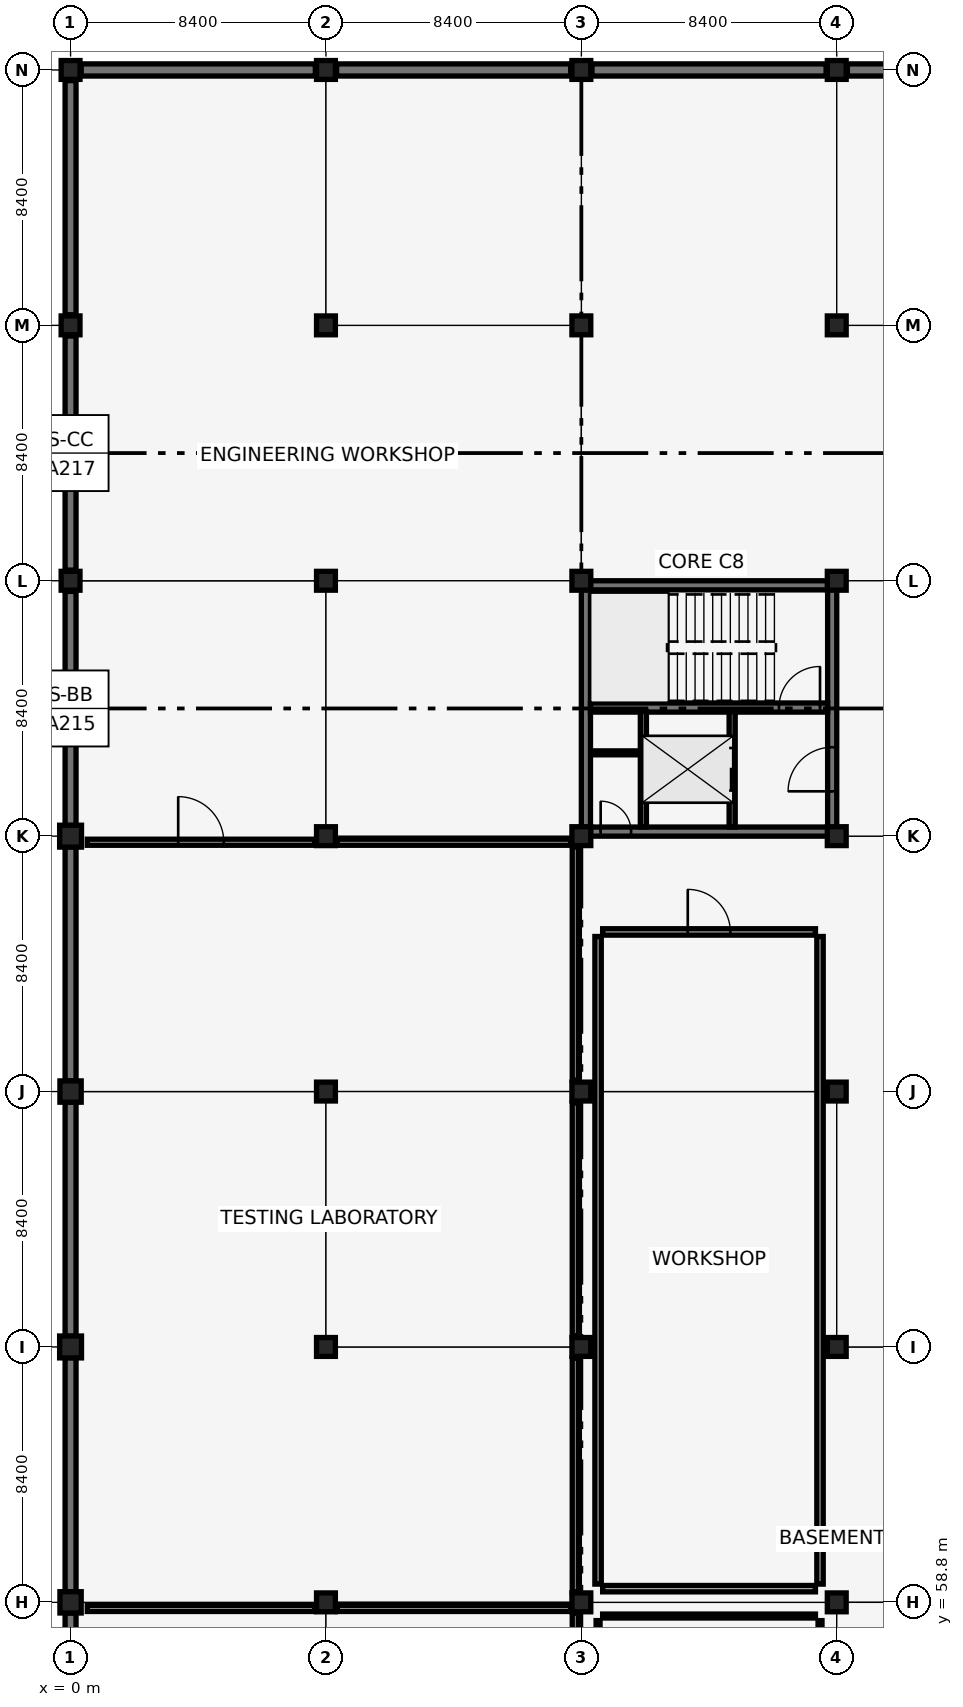
"""IFC4 building model, lengths in metres.
Left out: names, types, materials, properties, quantities, classifications, styles, units other than length and angle.
Written with IfcOpenShell. Run it as: python <this file> out.ifc"""

import sys

from ifc_helpers import new_model, si_unit, direction, frame, frame_2d, origin, origin_2d, place, context, subcontext, project, spatial, rectangle, extrude, element, fill, save


model = new_model("IFC4")
c1 = context("Model", 3, precision=1e-05, world=origin(), true_north=direction((0.0, 1.0)))
c2 = subcontext(c1, "Body", "Model", "MODEL_VIEW")
j1 = project(units=[si_unit("LENGTHUNIT", "METRE"), si_unit("PLANEANGLEUNIT", "RADIAN")], contexts=[c1])
p1 = place(None, origin())
s1 = spatial("IfcSite", under=j1, at=p1, CompositionType="ELEMENT")
p2 = place(p1, origin())
s2 = spatial("IfcBuilding", under=s1, at=p2, CompositionType="ELEMENT")
p3 = place(p2, frame((0.0, 0.0, -4.42)))
s3 = spatial("IfcBuildingStorey", under=s2, at=p3, CompositionType="ELEMENT", Elevation=-4.42)
p4 = place(p3, frame((0.0, 50.75, 0.0), z_axis=(0.0, 0.0, 1.0), x_axis=(0.0, 1.0, 0.0)))
e1 = element("IfcWall", 1, at=p4, inside=s3, PredefinedType="USERDEFINED", context=c2, shape_type="SweptSolid", body=[
    extrude(rectangle(XDim=7.7, YDim=0.36, at=frame_2d((3.85, 0.0))), origin(), (0.0, 0.0, 1.0), 4.12),
])
p5 = place(p3, frame((0.0, 59.15, 0.0), z_axis=(0.0, 0.0, 1.0), x_axis=(0.0, 1.0, 0.0)))
e2 = element("IfcWall", 2, at=p5, inside=s3, PredefinedType="USERDEFINED", context=c2, shape_type="SweptSolid", body=[
    extrude(rectangle(XDim=7.7, YDim=0.36, at=frame_2d((3.85, 0.0))), origin(), (0.0, 0.0, 1.0), 4.12),
])
for number, where, z_axis, x_axis in (
    (3, (0.0, 67.55, 0.0), (0.0, 0.0, 1.0), (0.0, 1.0, 0.0)),
    (4, (0.0, 75.95, 0.0), (0.0, 0.0, 1.0), (0.0, 1.0, 0.0)),
    (5, (0.0, 84.35, 0.0), (0.0, 0.0, 1.0), (0.0, 1.0, 0.0)),
    (6, (0.0, 92.75, 0.0), (0.0, 0.0, 1.0), (0.0, 1.0, 0.0)),
):
    element("IfcWall", number, at=place(p3, frame(where, z_axis=z_axis, x_axis=x_axis)), inside=s3, PredefinedType="USERDEFINED", context=c2, shape_type="SweptSolid", body=[
        extrude(rectangle(XDim=7.7, YDim=0.36, at=frame_2d((3.85, 0.0))), origin(), (0.0, 0.0, 1.0), 4.12),
    ])
p6 = place(p3, frame((0.35, 109.2, 0.0), z_axis=(0.0, 0.0, 1.0), x_axis=(1.0, 0.0, 0.0)))
e7 = element("IfcWall", 7, at=p6, inside=s3, PredefinedType="USERDEFINED", context=c2, shape_type="SweptSolid", body=[
    extrude(rectangle(XDim=7.7, YDim=0.4, at=frame_2d((3.85, 0.0))), origin(), (0.0, 0.0, 1.0), 4.12),
])
p7 = place(p3, frame((0.0, 101.15, 0.0), z_axis=(0.0, 0.0, 1.0), x_axis=(0.0, 1.0, 0.0)))
e8 = element("IfcWall", 8, at=p7, inside=s3, PredefinedType="USERDEFINED", context=c2, shape_type="SweptSolid", body=[
    extrude(rectangle(XDim=7.7, YDim=0.36, at=frame_2d((3.85, 0.0))), origin(), (0.0, 0.0, 1.0), 4.12),
])
p8 = place(p3, frame((8.75, 109.2, 0.0), z_axis=(0.0, 0.0, 1.0), x_axis=(1.0, 0.0, 0.0)))
e9 = element("IfcWall", 9, at=p8, inside=s3, PredefinedType="USERDEFINED", context=c2, shape_type="SweptSolid", body=[
    extrude(rectangle(XDim=7.7, YDim=0.4, at=frame_2d((3.85, 0.0))), origin(), (0.0, 0.0, 1.0), 4.12),
])
p9 = place(p3, frame((17.15, 109.2, 0.0), z_axis=(0.0, 0.0, 1.0), x_axis=(1.0, 0.0, 0.0)))
e10 = element("IfcWall", 10, at=p9, inside=s3, PredefinedType="USERDEFINED", context=c2, shape_type="SweptSolid", body=[
    extrude(rectangle(XDim=7.7, YDim=0.4, at=frame_2d((3.85, 0.0))), origin(), (0.0, 0.0, 1.0), 4.12),
])
p10 = place(p3, frame((25.55, 109.2, 0.0), z_axis=(0.0, 0.0, 1.0), x_axis=(1.0, 0.0, 0.0)))
e11 = element("IfcWall", 11, at=p10, inside=s3, PredefinedType="USERDEFINED", context=c2, shape_type="SweptSolid", body=[
    extrude(rectangle(XDim=7.7, YDim=0.4, at=frame_2d((3.85, 0.0))), origin(), (0.0, 0.0, 1.0), 4.12),
])
p11 = place(p3, frame((16.95, 84.15, 0.0), z_axis=(0.0, 0.0, 1.0), x_axis=(1.0, 0.0, 0.0)))
e12 = element("IfcWall", 12, at=p11, inside=s3, PredefinedType="SHEAR", context=c2, shape_type="SweptSolid", body=[
    extrude(rectangle(XDim=8.1, YDim=0.3, at=frame_2d((4.05, 0.0))), origin(), (0.0, 0.0, 1.0), 4.12),
])
p12 = place(p11, frame((0.485, 0.0, 0.0)))
e13 = element("IfcOpeningElement", 13, at=p12, cuts=e12, PredefinedType="OPENING", context=c2, shape_type="SweptSolid", body=[
    extrude(rectangle(XDim=1.0, YDim=2.15, at=frame_2d((0.5, 1.075))), frame((0.0, 0.16, 0.0), z_axis=(0.0, -1.0, 0.0), x_axis=(1.0, 0.0, 0.0)), (0.0, 0.0, 1.0), 0.32),
])
for number, where, z_axis, x_axis in (
    (14, (16.95, 92.25, 0.0), (0.0, 0.0, 1.0), (1.0, 0.0, 0.0)),
    (15, (16.95, 84.15, 0.0), (0.0, 0.0, 1.0), (0.0, 1.0, 0.0)),
):
    element("IfcWall", number, at=place(p3, frame(where, z_axis=z_axis, x_axis=x_axis)), inside=s3, PredefinedType="SHEAR", context=c2, shape_type="SweptSolid", body=[
        extrude(rectangle(XDim=8.1, YDim=0.3, at=frame_2d((4.05, 0.0))), origin(), (0.0, 0.0, 1.0), 4.12),
    ])
p13 = place(p3, frame((25.05, 84.15, 0.0), z_axis=(0.0, 0.0, 1.0), x_axis=(0.0, 1.0, 0.0)))
e16 = element("IfcWall", 16, at=p13, inside=s3, PredefinedType="SHEAR", context=c2, shape_type="SweptSolid", body=[
    extrude(rectangle(XDim=8.1, YDim=0.3, at=frame_2d((4.05, 0.0))), origin(), (0.0, 0.0, 1.0), 4.12),
])
p14 = place(p13, frame((1.325, 0.0, 0.0)))
e17 = element("IfcOpeningElement", 17, at=p14, cuts=e16, PredefinedType="OPENING", context=c2, shape_type="SweptSolid", body=[
    extrude(rectangle(XDim=1.45, YDim=2.15, at=frame_2d((0.725, 1.075))), frame((0.0, 0.16, 0.0), z_axis=(0.0, -1.0, 0.0), x_axis=(1.0, 0.0, 0.0)), (0.0, 0.0, 1.0), 0.32),
])
p15 = place(p3, frame((17.1, 88.23, 0.0), z_axis=(0.0, 0.0, 1.0), x_axis=(1.0, 0.0, 0.0)))
e18 = element("IfcWall", 18, at=p15, inside=s3, PredefinedType="SHEAR", context=c2, shape_type="SweptSolid", body=[
    extrude(rectangle(XDim=7.8, YDim=0.3, at=frame_2d((3.9, 0.0))), origin(), (0.0, 0.0, 1.0), 4.12),
])
p16 = place(p15, frame((6.2, 0.0, 0.0)))
e19 = element("IfcOpeningElement", 19, at=p16, cuts=e18, PredefinedType="OPENING", context=c2, shape_type="SweptSolid", body=[
    extrude(rectangle(XDim=1.35, YDim=2.15, at=frame_2d((0.675, 1.075))), frame((0.0, 0.16, 0.0), z_axis=(0.0, -1.0, 0.0), x_axis=(1.0, 0.0, 0.0)), (0.0, 0.0, 1.0), 0.32),
])
p17 = place(p3, frame((0.0, 58.8, -0.4), z_axis=(0.0, 0.0, 1.0), x_axis=(1.0, 0.0, 0.0)))
e20 = element("IfcColumn", 20, at=p17, inside=s3, PredefinedType="COLUMN", context=c2, shape_type="SweptSolid", body=[
    extrude(rectangle(XDim=0.7, YDim=0.7, at=origin_2d()), origin(), (0.0, 0.0, 1.0), 4.52),
])
p18 = place(p3, frame((0.0, 67.2, -0.4), z_axis=(0.0, 0.0, 1.0), x_axis=(1.0, 0.0, 0.0)))
e21 = element("IfcColumn", 21, at=p18, inside=s3, PredefinedType="COLUMN", context=c2, shape_type="SweptSolid", body=[
    extrude(rectangle(XDim=0.72, YDim=0.72, at=origin_2d()), origin(), (0.0, 0.0, 1.0), 4.52),
])
p19 = place(p3, frame((0.0, 75.6, -0.4), z_axis=(0.0, 0.0, 1.0), x_axis=(1.0, 0.0, 0.0)))
e22 = element("IfcColumn", 22, at=p19, inside=s3, PredefinedType="COLUMN", context=c2, shape_type="SweptSolid", body=[
    extrude(rectangle(XDim=0.7, YDim=0.7, at=origin_2d()), origin(), (0.0, 0.0, 1.0), 4.52),
])
p20 = place(p3, frame((0.0, 84.0, -0.4), z_axis=(0.0, 0.0, 1.0), x_axis=(1.0, 0.0, 0.0)))
e23 = element("IfcColumn", 23, at=p20, inside=s3, PredefinedType="COLUMN", context=c2, shape_type="SweptSolid", body=[
    extrude(rectangle(XDim=0.72, YDim=0.72, at=origin_2d()), origin(), (0.0, 0.0, 1.0), 4.52),
])
for number, where, z_axis, x_axis in (
    (24, (0.0, 92.4, -0.4), (0.0, 0.0, 1.0), (1.0, 0.0, 0.0)),
    (25, (0.0, 100.8, -0.4), (0.0, 0.0, 1.0), (1.0, 0.0, 0.0)),
    (26, (0.0, 109.2, -0.4), (0.0, 0.0, 1.0), (1.0, 0.0, 0.0)),
    (27, (8.4, 58.8, -0.4), (0.0, 0.0, 1.0), (1.0, 0.0, 0.0)),
    (28, (8.4, 67.2, -0.4), (0.0, 0.0, 1.0), (1.0, 0.0, 0.0)),
    (29, (8.4, 75.6, -0.4), (0.0, 0.0, 1.0), (1.0, 0.0, 0.0)),
    (30, (8.4, 84.0, -0.4), (0.0, 0.0, 1.0), (1.0, 0.0, 0.0)),
    (31, (8.4, 92.4, -0.4), (0.0, 0.0, 1.0), (1.0, 0.0, 0.0)),
    (32, (8.4, 100.8, -0.4), (0.0, 0.0, 1.0), (1.0, 0.0, 0.0)),
    (33, (8.4, 109.2, -0.4), (0.0, 0.0, 1.0), (1.0, 0.0, 0.0)),
    (34, (16.8, 58.8, -0.4), (0.0, 0.0, 1.0), (1.0, 0.0, 0.0)),
    (35, (16.8, 67.2, -0.4), (0.0, 0.0, 1.0), (1.0, 0.0, 0.0)),
    (36, (16.8, 75.6, -0.4), (0.0, 0.0, 1.0), (1.0, 0.0, 0.0)),
    (37, (16.8, 84.0, -0.4), (0.0, 0.0, 1.0), (1.0, 0.0, 0.0)),
    (38, (16.8, 92.4, -0.4), (0.0, 0.0, 1.0), (1.0, 0.0, 0.0)),
    (39, (16.8, 100.8, -0.4), (0.0, 0.0, 1.0), (1.0, 0.0, 0.0)),
    (40, (16.8, 109.2, -0.4), (0.0, 0.0, 1.0), (1.0, 0.0, 0.0)),
    (41, (25.2, 58.8, -0.4), (0.0, 0.0, 1.0), (1.0, 0.0, 0.0)),
    (42, (25.2, 67.2, -0.4), (0.0, 0.0, 1.0), (1.0, 0.0, 0.0)),
    (43, (25.2, 75.6, -0.4), (0.0, 0.0, 1.0), (1.0, 0.0, 0.0)),
    (44, (25.2, 84.0, -0.4), (0.0, 0.0, 1.0), (1.0, 0.0, 0.0)),
    (45, (25.2, 92.4, -0.4), (0.0, 0.0, 1.0), (1.0, 0.0, 0.0)),
    (46, (25.2, 100.8, -0.4), (0.0, 0.0, 1.0), (1.0, 0.0, 0.0)),
    (47, (25.2, 109.2, -0.4), (0.0, 0.0, 1.0), (1.0, 0.0, 0.0)),
):
    element("IfcColumn", number, at=place(p3, frame(where, z_axis=z_axis, x_axis=x_axis)), inside=s3, PredefinedType="COLUMN", context=c2, shape_type="SweptSolid", body=[
        extrude(rectangle(XDim=0.62, YDim=0.62, at=origin_2d()), origin(), (0.0, 0.0, 1.0), 4.52),
    ])
p21 = place(p3, frame((21.76, 84.3, 0.0), z_axis=(0.0, 0.0, 1.0), x_axis=(0.0, 1.0, 0.0)))
e48 = element("IfcWall", 48, at=p21, inside=s3, PredefinedType="SHEAR", context=c2, shape_type="SweptSolid", body=[
    extrude(rectangle(XDim=3.8, YDim=0.2, at=frame_2d((1.9, 0.0))), origin(), (0.0, 0.0, 1.0), 3.2),
])
p22 = place(p21, frame((1.2, 0.0, 0.0)))
e49 = element("IfcOpeningElement", 49, at=p22, cuts=e48, PredefinedType="OPENING", context=c2, shape_type="SweptSolid", body=[
    extrude(rectangle(XDim=1.4, YDim=2.2, at=frame_2d((0.7, 1.1))), frame((0.0, 0.11, 0.0), z_axis=(0.0, -1.0, 0.0), x_axis=(1.0, 0.0, 0.0)), (0.0, 0.0, 1.0), 0.22),
])
p23 = place(p3, frame((18.84, 84.3, 0.0), z_axis=(0.0, 0.0, 1.0), x_axis=(0.0, 1.0, 0.0)))
e50 = element("IfcWall", 50, at=p23, inside=s3, PredefinedType="SHEAR", context=c2, shape_type="SweptSolid", body=[
    extrude(rectangle(XDim=3.8, YDim=0.2, at=frame_2d((1.9, 0.0))), origin(), (0.0, 0.0, 1.0), 3.2),
])
p24 = place(p3, frame((17.12, 86.74, 0.0), z_axis=(0.0, 0.0, 1.0), x_axis=(1.0, 0.0, 0.0)))
e51 = element("IfcWall", 51, at=p24, inside=s3, PredefinedType="PARTITIONING", context=c2, shape_type="SweptSolid", body=[
    extrude(rectangle(XDim=1.62, YDim=0.13, at=frame_2d((0.81, 0.0))), origin(), (0.0, 0.0, 1.0), 3.28),
])
p25 = place(p3, frame((16.6, 50.77, 0.0), z_axis=(0.0, 0.0, 1.0), x_axis=(0.0, 1.0, 0.0)))
e52 = element("IfcWall", 52, at=p25, inside=s3, PredefinedType="PARTITIONING", context=c2, shape_type="SweptSolid", body=[
    extrude(rectangle(XDim=7.68, YDim=0.2, at=frame_2d((3.84, 0.0))), origin(), (0.0, 0.0, 1.0), 3.2),
])
p26 = place(p3, frame((0.55, 58.6, 0.0), z_axis=(0.0, 0.0, 1.0), x_axis=(1.0, 0.0, 0.0)))
e53 = element("IfcWall", 53, at=p26, inside=s3, PredefinedType="PARTITIONING", context=c2, shape_type="SweptSolid", body=[
    extrude(rectangle(XDim=7.48, YDim=0.2, at=frame_2d((3.74, 0.0))), origin(), (0.0, 0.0, 1.0), 3.2),
])
p27 = place(p3, frame((8.77, 58.6, 0.0), z_axis=(0.0, 0.0, 1.0), x_axis=(1.0, 0.0, 0.0)))
e54 = element("IfcWall", 54, at=p27, inside=s3, PredefinedType="PARTITIONING", context=c2, shape_type="SweptSolid", body=[
    extrude(rectangle(XDim=7.68, YDim=0.2, at=frame_2d((3.84, 0.0))), origin(), (0.0, 0.0, 1.0), 3.2),
])
p28 = place(p3, frame((0.55, 83.8, 0.0), z_axis=(0.0, 0.0, 1.0), x_axis=(1.0, 0.0, 0.0)))
e55 = element("IfcWall", 55, at=p28, inside=s3, PredefinedType="PARTITIONING", context=c2, shape_type="SweptSolid", body=[
    extrude(rectangle(XDim=7.48, YDim=0.2, at=frame_2d((3.74, 0.0))), origin(), (0.0, 0.0, 1.0), 3.2),
])
p29 = place(p28, frame((2.99, 0.0, 0.0)))
e56 = element("IfcOpeningElement", 56, at=p29, cuts=e55, PredefinedType="OPENING", context=c2, shape_type="SweptSolid", body=[
    extrude(rectangle(XDim=1.5, YDim=2.2, at=frame_2d((0.75, 1.1))), frame((0.0, 0.11, 0.0), z_axis=(0.0, -1.0, 0.0), x_axis=(1.0, 0.0, 0.0)), (0.0, 0.0, 1.0), 0.22),
])
p30 = place(p3, frame((8.77, 83.8, 0.0), z_axis=(0.0, 0.0, 1.0), x_axis=(1.0, 0.0, 0.0)))
e57 = element("IfcWall", 57, at=p30, inside=s3, PredefinedType="PARTITIONING", context=c2, shape_type="SweptSolid", body=[
    extrude(rectangle(XDim=7.68, YDim=0.2, at=frame_2d((3.84, 0.0))), origin(), (0.0, 0.0, 1.0), 3.2),
])
p31 = place(p3, frame((16.6, 59.15, 0.0), z_axis=(0.0, 0.0, 1.0), x_axis=(0.0, 1.0, 0.0)))
e58 = element("IfcWall", 58, at=p31, inside=s3, PredefinedType="PARTITIONING", context=c2, shape_type="SweptSolid", body=[
    extrude(rectangle(XDim=7.68, YDim=0.2, at=frame_2d((3.84, 0.0))), origin(), (0.0, 0.0, 1.0), 3.2),
])
p32 = place(p3, frame((16.6, 67.57, 0.0), z_axis=(0.0, 0.0, 1.0), x_axis=(0.0, 1.0, 0.0)))
e59 = element("IfcWall", 59, at=p32, inside=s3, PredefinedType="PARTITIONING", context=c2, shape_type="SweptSolid", body=[
    extrude(rectangle(XDim=7.66, YDim=0.2, at=frame_2d((3.83, 0.0))), origin(), (0.0, 0.0, 1.0), 3.2),
])
p33 = place(p3, frame((16.6, 75.97, 0.0), z_axis=(0.0, 0.0, 1.0), x_axis=(0.0, 1.0, 0.0)))
e60 = element("IfcWall", 60, at=p33, inside=s3, PredefinedType="PARTITIONING", context=c2, shape_type="SweptSolid", body=[
    extrude(rectangle(XDim=7.68, YDim=0.2, at=frame_2d((3.84, 0.0))), origin(), (0.0, 0.0, 1.0), 3.2),
])
p34 = place(p3, frame((24.65, 36.8, 0.0), z_axis=(0.0, 0.0, 1.0), x_axis=(0.0, 1.0, 0.0)))
e61 = element("IfcWall", 61, at=p34, inside=s3, PredefinedType="PARTITIONING", context=c2, shape_type="SweptSolid", body=[
    extrude(rectangle(XDim=21.4, YDim=0.13, at=frame_2d((10.7, 0.0))), origin(), (0.0, 0.0, 1.0), 3.2),
])
p35 = place(p3, frame((17.5, 58.35, 0.0), z_axis=(0.0, 0.0, 1.0), x_axis=(1.0, 0.0, 0.0)))
e62 = element("IfcWall", 62, at=p35, inside=s3, PredefinedType="PARTITIONING", context=c2, shape_type="SweptSolid", body=[
    extrude(rectangle(XDim=7.0, YDim=0.13, at=frame_2d((3.5, 0.0))), origin(), (0.0, 0.0, 1.0), 4.12),
])
p36 = place(p3, frame((17.35, 36.8, 0.0), z_axis=(0.0, 0.0, 1.0), x_axis=(0.0, 1.0, 0.0)))
e63 = element("IfcWall", 63, at=p36, inside=s3, PredefinedType="PARTITIONING", context=c2, shape_type="SweptSolid", body=[
    extrude(rectangle(XDim=21.4, YDim=0.13, at=frame_2d((10.7, 0.0))), origin(), (0.0, 0.0, 1.0), 3.2),
])
p37 = place(p3, frame((17.5, 80.85, 0.0), z_axis=(0.0, 0.0, 1.0), x_axis=(1.0, 0.0, 0.0)))
e64 = element("IfcWall", 64, at=p37, inside=s3, PredefinedType="PARTITIONING", context=c2, shape_type="SweptSolid", body=[
    extrude(rectangle(XDim=7.0, YDim=0.21, at=frame_2d((3.5, 0.0))), origin(), (0.0, 0.0, 1.0), 4.12),
])
p38 = place(p37, frame((2.8, 0.0, 0.0)))
e65 = element("IfcOpeningElement", 65, at=p38, cuts=e64, PredefinedType="OPENING", context=c2, shape_type="SweptSolid", body=[
    extrude(rectangle(XDim=1.4, YDim=2.2, at=frame_2d((0.7, 1.1))), frame((0.0, 0.115, 0.0), z_axis=(0.0, -1.0, 0.0), x_axis=(1.0, 0.0, 0.0)), (0.0, 0.0, 1.0), 0.23),
])
p39 = place(p3, frame((24.65, 59.4, 0.0), z_axis=(0.0, 0.0, 1.0), x_axis=(0.0, 1.0, 0.0)))
e66 = element("IfcWall", 66, at=p39, inside=s3, PredefinedType="PARTITIONING", context=c2, shape_type="SweptSolid", body=[
    extrude(rectangle(XDim=21.3, YDim=0.21, at=frame_2d((10.65, 0.0))), origin(), (0.0, 0.0, 1.0), 3.2),
])
p40 = place(p3, frame((17.5, 59.25, 0.0), z_axis=(0.0, 0.0, 1.0), x_axis=(1.0, 0.0, 0.0)))
e67 = element("IfcWall", 67, at=p40, inside=s3, PredefinedType="PARTITIONING", context=c2, shape_type="SweptSolid", body=[
    extrude(rectangle(XDim=7.0, YDim=0.21, at=frame_2d((3.5, 0.0))), origin(), (0.0, 0.0, 1.0), 4.12),
])
p41 = place(p3, frame((17.35, 59.4, 0.0), z_axis=(0.0, 0.0, 1.0), x_axis=(0.0, 1.0, 0.0)))
e68 = element("IfcWall", 68, at=p41, inside=s3, PredefinedType="PARTITIONING", context=c2, shape_type="SweptSolid", body=[
    extrude(rectangle(XDim=21.3, YDim=0.21, at=frame_2d((10.65, 0.0))), origin(), (0.0, 0.0, 1.0), 3.2),
])
p42 = place(p16, origin())
e69 = element("IfcDoor", 69, at=p42, inside=s3, OperationType="SINGLE_SWING_RIGHT", PredefinedType="DOOR", context=c2, shape_type="SweptSolid", body=[
    extrude(rectangle(XDim=1.35, YDim=2.15, at=frame_2d((0.675, 1.075))), frame((0.0, 0.025, 0.0), z_axis=(0.0, -1.0, 0.0), x_axis=(1.0, 0.0, 0.0)), (0.0, 0.0, 1.0), 0.05),
])
fill(e19, e69)
p43 = place(p22, origin())
e70 = element("IfcDoor", 70, at=p43, inside=s3, OperationType="SLIDING_TO_LEFT", PredefinedType="DOOR", context=c2, shape_type="SweptSolid", body=[
    extrude(rectangle(XDim=1.4, YDim=2.2, at=frame_2d((0.7, 1.1))), frame((0.0, 0.025, 0.0), z_axis=(0.0, -1.0, 0.0), x_axis=(1.0, 0.0, 0.0)), (0.0, 0.0, 1.0), 0.05),
])
fill(e49, e70)
p44 = place(p14, origin())
e71 = element("IfcDoor", 71, at=p44, inside=s3, OperationType="DOUBLE_DOOR_SINGLE_SWING", PredefinedType="DOOR", context=c2, shape_type="SweptSolid", body=[
    extrude(rectangle(XDim=1.45, YDim=2.15, at=frame_2d((0.725, 1.075))), frame((0.0, 0.025, 0.0), z_axis=(0.0, -1.0, 0.0), x_axis=(1.0, 0.0, 0.0)), (0.0, 0.0, 1.0), 0.05),
])
fill(e17, e71)
p45 = place(p12, origin())
e72 = element("IfcDoor", 72, at=p45, inside=s3, OperationType="SINGLE_SWING_LEFT", PredefinedType="DOOR", context=c2, shape_type="SweptSolid", body=[
    extrude(rectangle(XDim=1.0, YDim=2.15, at=frame_2d((0.5, 1.075))), frame((0.0, 0.025, 0.0), z_axis=(0.0, -1.0, 0.0), x_axis=(1.0, 0.0, 0.0)), (0.0, 0.0, 1.0), 0.05),
])
fill(e13, e72)
p46 = place(p29, origin())
e73 = element("IfcDoor", 73, at=p46, inside=s3, OperationType="DOUBLE_DOOR_SINGLE_SWING", PredefinedType="DOOR", context=c2, shape_type="SweptSolid", body=[
    extrude(rectangle(XDim=1.5, YDim=2.2, at=frame_2d((0.75, 1.1))), frame((0.0, 0.025, 0.0), z_axis=(0.0, -1.0, 0.0), x_axis=(1.0, 0.0, 0.0)), (0.0, 0.0, 1.0), 0.05),
])
fill(e56, e73)
p47 = place(p38, origin())
e74 = element("IfcDoor", 74, at=p47, inside=s3, OperationType="DOUBLE_DOOR_SINGLE_SWING", PredefinedType="DOOR", context=c2, shape_type="SweptSolid", body=[
    extrude(rectangle(XDim=1.4, YDim=2.2, at=frame_2d((0.7, 1.1))), frame((0.0, 0.025, 0.0), z_axis=(0.0, -1.0, 0.0), x_axis=(1.0, 0.0, 0.0)), (0.0, 0.0, 1.0), 0.05),
])
fill(e65, e74)
save(model, sys.argv[1])
